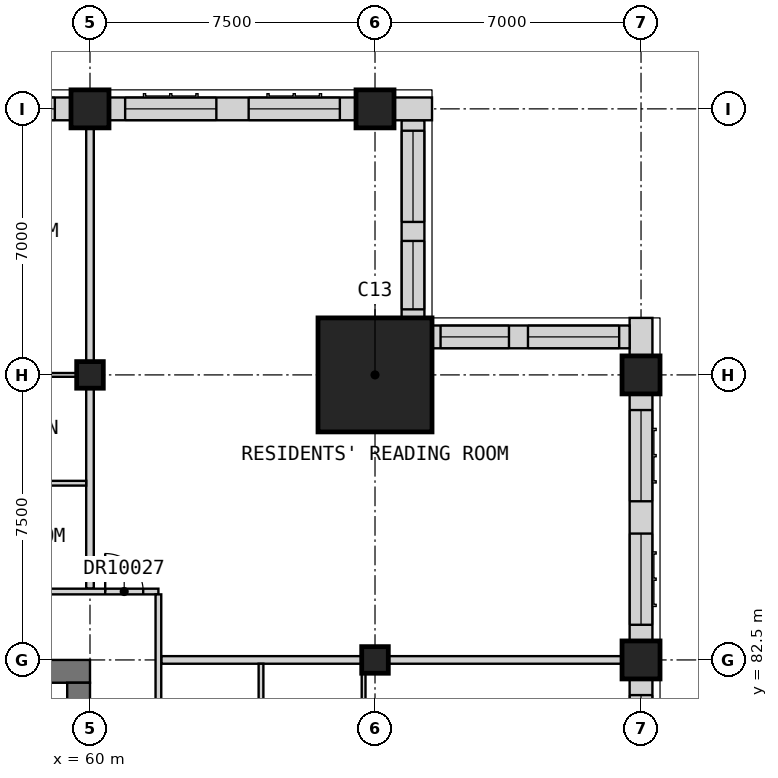
"""IFC4 building model, lengths in metres.
Left out: names, types, materials, properties, quantities, classifications, styles, units other than length and angle.
Written with IfcOpenShell. Run it as: python <this file> out.ifc"""

import sys

from ifc_helpers import new_model, si_unit, direction, frame, frame_2d, origin, origin_2d, place, context, subcontext, project, spatial, rectangle, extrude, element, fill, save


model = new_model("IFC4")
c1 = context("Model", 3, precision=1e-05, world=origin(), true_north=direction((0.0, 1.0)))
c2 = subcontext(c1, "Body", "Model", "MODEL_VIEW")
j1 = project(units=[si_unit("LENGTHUNIT", "METRE"), si_unit("PLANEANGLEUNIT", "RADIAN")], contexts=[c1])
p1 = place(None, origin())
s1 = spatial("IfcSite", under=j1, at=p1, CompositionType="ELEMENT")
p2 = place(p1, origin())
s2 = spatial("IfcBuilding", under=s1, at=p2, CompositionType="ELEMENT")
p3 = place(p2, frame((0.0, 0.0, 273.2)))
s3 = spatial("IfcBuildingStorey", under=s2, at=p3, CompositionType="ELEMENT", Elevation=273.2)
p4 = place(p3, frame((60.0, 90.0, 0.0), z_axis=(0.0, 0.0, 1.0), x_axis=(1.0, 0.0, 0.0)))
e1 = element("IfcColumn", 1, at=p4, inside=s3, PredefinedType="COLUMN", context=c2, shape_type="SweptSolid", body=[
    extrude(rectangle(XDim=0.7, YDim=0.7, at=origin_2d()), origin(), (0.0, 0.0, 1.0), 3.5),
])
p5 = place(p3, frame((60.0, 97.0, 0.0), z_axis=(0.0, 0.0, 1.0), x_axis=(1.0, 0.0, 0.0)))
e2 = element("IfcColumn", 2, at=p5, inside=s3, PredefinedType="COLUMN", context=c2, shape_type="SweptSolid", body=[
    extrude(rectangle(XDim=1.0, YDim=1.0, at=origin_2d()), origin(), (0.0, 0.0, 1.0), 3.5),
])
p6 = place(p3, frame((67.5, 82.5, 0.0), z_axis=(0.0, 0.0, 1.0), x_axis=(1.0, 0.0, 0.0)))
e3 = element("IfcColumn", 3, at=p6, inside=s3, PredefinedType="COLUMN", context=c2, shape_type="SweptSolid", body=[
    extrude(rectangle(XDim=0.7, YDim=0.7, at=origin_2d()), origin(), (0.0, 0.0, 1.0), 3.5),
])
for number, where, z_axis, x_axis in (
    (4, (67.5, 97.0, 0.0), (0.0, 0.0, 1.0), (1.0, 0.0, 0.0)),
    (5, (74.5, 82.5, 0.0), (0.0, 0.0, 1.0), (1.0, 0.0, 0.0)),
    (6, (74.5, 90.0, 0.0), (0.0, 0.0, 1.0), (1.0, 0.0, 0.0)),
):
    element("IfcColumn", number, at=place(p3, frame(where, z_axis=z_axis, x_axis=x_axis)), inside=s3, PredefinedType="COLUMN", context=c2, shape_type="SweptSolid", body=[
        extrude(rectangle(XDim=1.0, YDim=1.0, at=origin_2d()), origin(), (0.0, 0.0, 1.0), 3.5),
    ])
p7 = place(p3, frame((67.5, 90.0, 0.0), z_axis=(0.0, 0.0, 1.0), x_axis=(1.0, 0.0, 0.0)))
e7 = element("IfcColumn", 7, at=p7, inside=s3, PredefinedType="COLUMN", context=c2, shape_type="SweptSolid", body=[
    extrude(rectangle(XDim=3.0, YDim=3.0, at=origin_2d()), origin(), (0.0, 0.0, 1.0), 3.5),
])
p8 = place(p3, frame((30.0, 82.2, 0.0), z_axis=(0.0, 0.0, 1.0), x_axis=(1.0, 0.0, 0.0)))
e8 = element("IfcWall", 8, at=p8, inside=s3, PredefinedType="SHEAR", context=c2, shape_type="SweptSolid", body=[
    extrude(rectangle(XDim=30.0, YDim=0.6, at=frame_2d((15.0, 0.0))), origin(), (0.0, 0.0, 1.0), 3.5),
])
p9 = place(p3, frame((59.7, 60.6, 0.0), z_axis=(0.0, 0.0, 1.0), x_axis=(0.0, 1.0, 0.0)))
e9 = element("IfcWall", 9, at=p9, inside=s3, PredefinedType="SHEAR", context=c2, shape_type="SweptSolid", body=[
    extrude(rectangle(XDim=21.3, YDim=0.6, at=frame_2d((10.65, 0.0))), origin(), (0.0, 0.0, 1.0), 3.5),
])
p10 = place(p9, frame((14.9, 0.0, 0.0)))
e10 = element("IfcOpeningElement", 10, at=p10, cuts=e9, PredefinedType="OPENING", context=c2, shape_type="SweptSolid", body=[
    extrude(rectangle(XDim=1.8, YDim=2.1, at=frame_2d((0.9, 1.05))), frame((0.0, 0.31, 0.0), z_axis=(0.0, -1.0, 0.0), x_axis=(1.0, 0.0, 0.0)), (0.0, 0.0, 1.0), 0.62),
])
p11 = place(p3, frame((74.5, 75.5, 0.0), z_axis=(0.0, 0.0, 1.0), x_axis=(0.0, 1.0, 0.0)))
e11 = element("IfcWall", 11, at=p11, inside=s3, PredefinedType="SOLIDWALL", context=c2, shape_type="SweptSolid", body=[
    extrude(rectangle(XDim=6.5, YDim=0.6, at=frame_2d((3.25, 0.0))), origin(), (0.0, 0.0, 1.0), 2.75),
])
p12 = place(p11, frame((0.425, 0.0, 0.8)))
e12 = element("IfcOpeningElement", 12, at=p12, cuts=e11, PredefinedType="OPENING", context=c2, shape_type="SweptSolid", body=[
    extrude(rectangle(XDim=2.4, YDim=1.8, at=frame_2d((1.2, 0.9))), frame((0.0, 0.31, 0.0), z_axis=(0.0, -1.0, 0.0), x_axis=(1.0, 0.0, 0.0)), (0.0, 0.0, 1.0), 0.62),
])
p13 = place(p11, frame((3.675, 0.0, 0.8)))
e13 = element("IfcOpeningElement", 13, at=p13, cuts=e11, PredefinedType="OPENING", context=c2, shape_type="SweptSolid", body=[
    extrude(rectangle(XDim=2.4, YDim=1.8, at=frame_2d((1.2, 0.9))), frame((0.0, 0.31, 0.0), z_axis=(0.0, -1.0, 0.0), x_axis=(1.0, 0.0, 0.0)), (0.0, 0.0, 1.0), 0.62),
])
p14 = place(p3, frame((74.5, 83.0, 0.0), z_axis=(0.0, 0.0, 1.0), x_axis=(0.0, 1.0, 0.0)))
e14 = element("IfcWall", 14, at=p14, inside=s3, PredefinedType="SOLIDWALL", context=c2, shape_type="SweptSolid", body=[
    extrude(rectangle(XDim=6.5, YDim=0.6, at=frame_2d((3.25, 0.0))), origin(), (0.0, 0.0, 1.0), 2.75),
])
p15 = place(p14, frame((0.425, 0.0, 0.8)))
e15 = element("IfcOpeningElement", 15, at=p15, cuts=e14, PredefinedType="OPENING", context=c2, shape_type="SweptSolid", body=[
    extrude(rectangle(XDim=2.4, YDim=1.8, at=frame_2d((1.2, 0.9))), frame((0.0, 0.31, 0.0), z_axis=(0.0, -1.0, 0.0), x_axis=(1.0, 0.0, 0.0)), (0.0, 0.0, 1.0), 0.62),
])
p16 = place(p14, frame((3.675, 0.0, 0.8)))
e16 = element("IfcOpeningElement", 16, at=p16, cuts=e14, PredefinedType="OPENING", context=c2, shape_type="SweptSolid", body=[
    extrude(rectangle(XDim=2.4, YDim=1.8, at=frame_2d((1.2, 0.9))), frame((0.0, 0.31, 0.0), z_axis=(0.0, -1.0, 0.0), x_axis=(1.0, 0.0, 0.0)), (0.0, 0.0, 1.0), 0.62),
])
p17 = place(p3, frame((74.5, 90.5, 0.0), z_axis=(0.0, 0.0, 1.0), x_axis=(0.0, 1.0, 0.0)))
e17 = element("IfcWall", 17, at=p17, inside=s3, PredefinedType="SOLIDWALL", context=c2, shape_type="SweptSolid", body=[
    extrude(rectangle(XDim=1.0, YDim=0.6, at=frame_2d((0.5, 0.0))), origin(), (0.0, 0.0, 1.0), 3.25),
])
p18 = place(p3, frame((74.2, 91.0, 0.0), z_axis=(0.0, 0.0, 1.0), x_axis=(-1.0, 0.0, 0.0)))
e18 = element("IfcWall", 18, at=p18, inside=s3, PredefinedType="SOLIDWALL", context=c2, shape_type="SweptSolid", body=[
    extrude(rectangle(XDim=5.2, YDim=0.6, at=frame_2d((2.6, 0.0))), origin(), (0.0, 0.0, 1.0), 3.25),
])
p19 = place(p18, frame((3.175, 0.0, 0.8)))
e19 = element("IfcOpeningElement", 19, at=p19, cuts=e18, PredefinedType="OPENING", context=c2, shape_type="SweptSolid", body=[
    extrude(rectangle(XDim=1.8, YDim=1.8, at=frame_2d((0.9, 0.9))), frame((0.0, 0.31, 0.0), z_axis=(0.0, -1.0, 0.0), x_axis=(1.0, 0.0, 0.0)), (0.0, 0.0, 1.0), 0.62),
])
p20 = place(p18, frame((0.275, 0.0, 0.8)))
e20 = element("IfcOpeningElement", 20, at=p20, cuts=e18, PredefinedType="OPENING", context=c2, shape_type="SweptSolid", body=[
    extrude(rectangle(XDim=2.4, YDim=1.8, at=frame_2d((1.2, 0.9))), frame((0.0, 0.31, 0.0), z_axis=(0.0, -1.0, 0.0), x_axis=(1.0, 0.0, 0.0)), (0.0, 0.0, 1.0), 0.62),
])
p21 = place(p3, frame((68.5, 91.5, 0.0), z_axis=(0.0, 0.0, 1.0), x_axis=(0.0, 1.0, 0.0)))
e21 = element("IfcWall", 21, at=p21, inside=s3, PredefinedType="SOLIDWALL", context=c2, shape_type="SweptSolid", body=[
    extrude(rectangle(XDim=5.2, YDim=0.6, at=frame_2d((2.6, 0.0))), origin(), (0.0, 0.0, 1.0), 3.25),
])
p22 = place(p21, frame((0.225, 0.0, 0.8)))
e22 = element("IfcOpeningElement", 22, at=p22, cuts=e21, PredefinedType="OPENING", context=c2, shape_type="SweptSolid", body=[
    extrude(rectangle(XDim=1.8, YDim=1.8, at=frame_2d((0.9, 0.9))), frame((0.0, 0.31, 0.0), z_axis=(0.0, -1.0, 0.0), x_axis=(1.0, 0.0, 0.0)), (0.0, 0.0, 1.0), 0.62),
])
p23 = place(p21, frame((2.525, 0.0, 0.8)))
e23 = element("IfcOpeningElement", 23, at=p23, cuts=e21, PredefinedType="OPENING", context=c2, shape_type="SweptSolid", body=[
    extrude(rectangle(XDim=2.4, YDim=1.8, at=frame_2d((1.2, 0.9))), frame((0.0, 0.31, 0.0), z_axis=(0.0, -1.0, 0.0), x_axis=(1.0, 0.0, 0.0)), (0.0, 0.0, 1.0), 0.62),
])
p24 = place(p3, frame((69.0, 97.0, 0.0), z_axis=(0.0, 0.0, 1.0), x_axis=(-1.0, 0.0, 0.0)))
e24 = element("IfcWall", 24, at=p24, inside=s3, PredefinedType="SOLIDWALL", context=c2, shape_type="SweptSolid", body=[
    extrude(rectangle(XDim=1.0, YDim=0.6, at=frame_2d((0.5, 0.0))), origin(), (0.0, 0.0, 1.0), 3.25),
])
p25 = place(p3, frame((67.0, 97.0, 0.0), z_axis=(0.0, 0.0, 1.0), x_axis=(-1.0, 0.0, 0.0)))
e25 = element("IfcWall", 25, at=p25, inside=s3, PredefinedType="SOLIDWALL", context=c2, shape_type="SweptSolid", body=[
    extrude(rectangle(XDim=6.5, YDim=0.6, at=frame_2d((3.25, 0.0))), origin(), (0.0, 0.0, 1.0), 2.75),
])
p26 = place(p25, frame((3.675, 0.0, 0.8)))
e26 = element("IfcOpeningElement", 26, at=p26, cuts=e25, PredefinedType="OPENING", context=c2, shape_type="SweptSolid", body=[
    extrude(rectangle(XDim=2.4, YDim=1.8, at=frame_2d((1.2, 0.9))), frame((0.0, 0.31, 0.0), z_axis=(0.0, -1.0, 0.0), x_axis=(1.0, 0.0, 0.0)), (0.0, 0.0, 1.0), 0.62),
])
p27 = place(p25, frame((0.425, 0.0, 0.8)))
e27 = element("IfcOpeningElement", 27, at=p27, cuts=e25, PredefinedType="OPENING", context=c2, shape_type="SweptSolid", body=[
    extrude(rectangle(XDim=2.4, YDim=1.8, at=frame_2d((1.2, 0.9))), frame((0.0, 0.31, 0.0), z_axis=(0.0, -1.0, 0.0), x_axis=(1.0, 0.0, 0.0)), (0.0, 0.0, 1.0), 0.62),
])
p28 = place(p3, frame((59.5, 97.0, 0.0), z_axis=(0.0, 0.0, 1.0), x_axis=(-1.0, 0.0, 0.0)))
e28 = element("IfcWall", 28, at=p28, inside=s3, PredefinedType="SOLIDWALL", context=c2, shape_type="SweptSolid", body=[
    extrude(rectangle(XDim=6.5, YDim=0.6, at=frame_2d((3.25, 0.0))), origin(), (0.0, 0.0, 1.0), 2.75),
])
p29 = place(p28, frame((3.675, 0.0, 0.8)))
e29 = element("IfcOpeningElement", 29, at=p29, cuts=e28, PredefinedType="OPENING", context=c2, shape_type="SweptSolid", body=[
    extrude(rectangle(XDim=2.4, YDim=1.8, at=frame_2d((1.2, 0.9))), frame((0.0, 0.31, 0.0), z_axis=(0.0, -1.0, 0.0), x_axis=(1.0, 0.0, 0.0)), (0.0, 0.0, 1.0), 0.62),
])
p30 = place(p28, frame((0.425, 0.0, 0.8)))
e30 = element("IfcOpeningElement", 30, at=p30, cuts=e28, PredefinedType="OPENING", context=c2, shape_type="SweptSolid", body=[
    extrude(rectangle(XDim=2.4, YDim=1.8, at=frame_2d((1.2, 0.9))), frame((0.0, 0.31, 0.0), z_axis=(0.0, -1.0, 0.0), x_axis=(1.0, 0.0, 0.0)), (0.0, 0.0, 1.0), 0.62),
])
for number, where, z_axis, x_axis in (
    (31, (61.875, 82.5, 0.0), (0.0, 0.0, 1.0), (1.0, 0.0, 0.0)),
    (32, (60.0, 84.375, 0.0), (0.0, 0.0, 1.0), (0.0, 1.0, 0.0)),
):
    element("IfcWall", number, at=place(p3, frame(where, z_axis=z_axis, x_axis=x_axis)), inside=s3, PredefinedType="PARTITIONING", context=c2, shape_type="SweptSolid", body=[
        extrude(rectangle(XDim=13.125, YDim=0.2, at=frame_2d((6.562, 0.0))), origin(), (0.0, 0.0, 1.0), 3.25),
    ])
p31 = place(p3, frame((33.75, 84.3, 0.0), z_axis=(0.0, 0.0, 1.0), x_axis=(1.0, 0.0, 0.0)))
e33 = element("IfcWall", 33, at=p31, inside=s3, PredefinedType="PARTITIONING", context=c2, shape_type="SweptSolid", body=[
    extrude(rectangle(XDim=28.05, YDim=0.15, at=frame_2d((14.025, 0.0))), origin(), (0.0, 0.0, 1.0), 3.25),
])
p32 = place(p31, frame((5.125, 0.0, 0.0)))
e34 = element("IfcOpeningElement", 34, at=p32, cuts=e33, PredefinedType="OPENING", context=c2, shape_type="SweptSolid", body=[
    extrude(rectangle(XDim=1.0, YDim=2.1, at=frame_2d((0.5, 1.05))), frame((0.0, 0.085, 0.0), z_axis=(0.0, -1.0, 0.0), x_axis=(1.0, 0.0, 0.0)), (0.0, 0.0, 1.0), 0.17),
])
p33 = place(p31, frame((12.675, 0.0, 0.0)))
e35 = element("IfcOpeningElement", 35, at=p33, cuts=e33, PredefinedType="OPENING", context=c2, shape_type="SweptSolid", body=[
    extrude(rectangle(XDim=0.9, YDim=2.1, at=frame_2d((0.45, 1.05))), frame((0.0, 0.085, 0.0), z_axis=(0.0, -1.0, 0.0), x_axis=(1.0, 0.0, 0.0)), (0.0, 0.0, 1.0), 0.17),
])
p34 = place(p31, frame((20.175, 0.0, 0.0)))
e36 = element("IfcOpeningElement", 36, at=p34, cuts=e33, PredefinedType="OPENING", context=c2, shape_type="SweptSolid", body=[
    extrude(rectangle(XDim=0.9, YDim=2.1, at=frame_2d((0.45, 1.05))), frame((0.0, 0.085, 0.0), z_axis=(0.0, -1.0, 0.0), x_axis=(1.0, 0.0, 0.0)), (0.0, 0.0, 1.0), 0.17),
])
p35 = place(p31, frame((26.65, 0.0, 0.0)))
e37 = element("IfcOpeningElement", 37, at=p35, cuts=e33, PredefinedType="OPENING", context=c2, shape_type="SweptSolid", body=[
    extrude(rectangle(XDim=1.0, YDim=2.1, at=frame_2d((0.5, 1.05))), frame((0.0, 0.085, 0.0), z_axis=(0.0, -1.0, 0.0), x_axis=(1.0, 0.0, 0.0)), (0.0, 0.0, 1.0), 0.17),
])
p36 = place(p3, frame((61.8, 58.275, 0.0), z_axis=(0.0, 0.0, 1.0), x_axis=(0.0, 1.0, 0.0)))
e38 = element("IfcWall", 38, at=p36, inside=s3, PredefinedType="PARTITIONING", context=c2, shape_type="SweptSolid", body=[
    extrude(rectangle(XDim=25.95, YDim=0.15, at=frame_2d((12.975, 0.0))), origin(), (0.0, 0.0, 1.0), 3.25),
])
p37 = place(p36, frame((6.9, 0.0, 0.0)))
e39 = element("IfcOpeningElement", 39, at=p37, cuts=e38, PredefinedType="OPENING", context=c2, shape_type="SweptSolid", body=[
    extrude(rectangle(XDim=0.9, YDim=2.1, at=frame_2d((0.45, 1.05))), frame((0.0, 0.085, 0.0), z_axis=(0.0, -1.0, 0.0), x_axis=(1.0, 0.0, 0.0)), (0.0, 0.0, 1.0), 0.17),
])
p38 = place(p36, frame((18.15, 0.0, 0.0)))
e40 = element("IfcOpeningElement", 40, at=p38, cuts=e38, PredefinedType="OPENING", context=c2, shape_type="SweptSolid", body=[
    extrude(rectangle(XDim=0.9, YDim=2.1, at=frame_2d((0.45, 1.05))), frame((0.0, 0.085, 0.0), z_axis=(0.0, -1.0, 0.0), x_axis=(1.0, 0.0, 0.0)), (0.0, 0.0, 1.0), 0.17),
])
p39 = place(p3, frame((45.1, 90.0, 0.0), z_axis=(0.0, 0.0, 1.0), x_axis=(1.0, 0.0, 0.0)))
e41 = element("IfcWall", 41, at=p39, inside=s3, PredefinedType="PARTITIONING", context=c2, shape_type="SweptSolid", body=[
    extrude(rectangle(XDim=14.8, YDim=0.1, at=frame_2d((7.4, 0.0))), origin(), (0.0, 0.0, 1.0), 3.25),
])
p40 = place(p39, frame((1.325, 0.0, 0.0)))
e42 = element("IfcOpeningElement", 42, at=p40, cuts=e41, PredefinedType="OPENING", context=c2, shape_type="SweptSolid", body=[
    extrude(rectangle(XDim=0.9, YDim=2.1, at=frame_2d((0.45, 1.05))), frame((0.0, 0.06, 0.0), z_axis=(0.0, -1.0, 0.0), x_axis=(1.0, 0.0, 0.0)), (0.0, 0.0, 1.0), 0.12),
])
p41 = place(p39, frame((8.825, 0.0, 0.0)))
e43 = element("IfcOpeningElement", 43, at=p41, cuts=e41, PredefinedType="OPENING", context=c2, shape_type="SweptSolid", body=[
    extrude(rectangle(XDim=0.9, YDim=2.1, at=frame_2d((0.45, 1.05))), frame((0.0, 0.06, 0.0), z_axis=(0.0, -1.0, 0.0), x_axis=(1.0, 0.0, 0.0)), (0.0, 0.0, 1.0), 0.12),
])
p42 = place(p3, frame((67.2, 60.1, 0.0), z_axis=(0.0, 0.0, 1.0), x_axis=(0.0, 1.0, 0.0)))
e44 = element("IfcWall", 44, at=p42, inside=s3, PredefinedType="PARTITIONING", context=c2, shape_type="SweptSolid", body=[
    extrude(rectangle(XDim=22.3, YDim=0.1, at=frame_2d((11.15, 0.0))), origin(), (0.0, 0.0, 1.0), 3.25),
])
p43 = place(p42, frame((1.325, 0.0, 0.0)))
e45 = element("IfcOpeningElement", 45, at=p43, cuts=e44, PredefinedType="OPENING", context=c2, shape_type="SweptSolid", body=[
    extrude(rectangle(XDim=0.9, YDim=2.1, at=frame_2d((0.45, 1.05))), frame((0.0, 0.06, 0.0), z_axis=(0.0, -1.0, 0.0), x_axis=(1.0, 0.0, 0.0)), (0.0, 0.0, 1.0), 0.12),
])
p44 = place(p42, frame((5.075, 0.0, 0.0)))
e46 = element("IfcOpeningElement", 46, at=p44, cuts=e44, PredefinedType="OPENING", context=c2, shape_type="SweptSolid", body=[
    extrude(rectangle(XDim=0.9, YDim=2.1, at=frame_2d((0.45, 1.05))), frame((0.0, 0.06, 0.0), z_axis=(0.0, -1.0, 0.0), x_axis=(1.0, 0.0, 0.0)), (0.0, 0.0, 1.0), 0.12),
])
p45 = place(p42, frame((12.575, 0.0, 0.0)))
e47 = element("IfcOpeningElement", 47, at=p45, cuts=e44, PredefinedType="OPENING", context=c2, shape_type="SweptSolid", body=[
    extrude(rectangle(XDim=0.9, YDim=2.1, at=frame_2d((0.45, 1.05))), frame((0.0, 0.06, 0.0), z_axis=(0.0, -1.0, 0.0), x_axis=(1.0, 0.0, 0.0)), (0.0, 0.0, 1.0), 0.12),
])
p46 = place(p42, frame((16.325, 0.0, 0.0)))
e48 = element("IfcOpeningElement", 48, at=p46, cuts=e44, PredefinedType="OPENING", context=c2, shape_type="SweptSolid", body=[
    extrude(rectangle(XDim=0.9, YDim=2.1, at=frame_2d((0.45, 1.05))), frame((0.0, 0.06, 0.0), z_axis=(0.0, -1.0, 0.0), x_axis=(1.0, 0.0, 0.0)), (0.0, 0.0, 1.0), 0.12),
])
p47 = place(p3, frame((56.25, 87.15, 0.0), z_axis=(0.0, 0.0, 1.0), x_axis=(1.0, 0.0, 0.0)))
e49 = element("IfcWall", 49, at=p47, inside=s3, PredefinedType="PARTITIONING", context=c2, shape_type="SweptSolid", body=[
    extrude(rectangle(XDim=3.65, YDim=0.125, at=frame_2d((1.825, 0.0))), origin(), (0.0, 0.0, 1.0), 3.25),
])
p48 = place(p3, frame((64.5, 78.812, 0.0), z_axis=(0.0, 0.0, 1.0), x_axis=(0.0, 1.0, 0.0)))
e50 = element("IfcWall", 50, at=p48, inside=s3, PredefinedType="PARTITIONING", context=c2, shape_type="SweptSolid", body=[
    extrude(rectangle(XDim=3.587, YDim=0.125, at=frame_2d((1.794, 0.0))), origin(), (0.0, 0.0, 1.0), 3.25),
])
p49 = place(p13, origin())
e51 = element("IfcWindow", 51, at=p49, inside=s3, PartitioningType="SINGLE_PANEL", PredefinedType="WINDOW", context=c2, shape_type="SweptSolid", body=[
    extrude(rectangle(XDim=2.4, YDim=1.8, at=frame_2d((1.2, 0.9))), frame((0.0, -0.07, 0.0), z_axis=(0.0, -1.0, 0.0), x_axis=(1.0, 0.0, 0.0)), (0.0, 0.0, 1.0), 0.06),
])
fill(e13, e51)
p50 = place(p15, origin())
e52 = element("IfcWindow", 52, at=p50, inside=s3, PartitioningType="SINGLE_PANEL", PredefinedType="WINDOW", context=c2, shape_type="SweptSolid", body=[
    extrude(rectangle(XDim=2.4, YDim=1.8, at=frame_2d((1.2, 0.9))), frame((0.0, -0.07, 0.0), z_axis=(0.0, -1.0, 0.0), x_axis=(1.0, 0.0, 0.0)), (0.0, 0.0, 1.0), 0.06),
])
fill(e15, e52)
p51 = place(p16, origin())
e53 = element("IfcWindow", 53, at=p51, inside=s3, PartitioningType="SINGLE_PANEL", PredefinedType="WINDOW", context=c2, shape_type="SweptSolid", body=[
    extrude(rectangle(XDim=2.4, YDim=1.8, at=frame_2d((1.2, 0.9))), frame((0.0, -0.07, 0.0), z_axis=(0.0, -1.0, 0.0), x_axis=(1.0, 0.0, 0.0)), (0.0, 0.0, 1.0), 0.06),
])
fill(e16, e53)
p52 = place(p19, origin())
e54 = element("IfcWindow", 54, at=p52, inside=s3, PartitioningType="SINGLE_PANEL", PredefinedType="WINDOW", context=c2, shape_type="SweptSolid", body=[
    extrude(rectangle(XDim=1.8, YDim=1.8, at=frame_2d((0.9, 0.9))), frame((0.0, -0.07, 0.0), z_axis=(0.0, -1.0, 0.0), x_axis=(1.0, 0.0, 0.0)), (0.0, 0.0, 1.0), 0.06),
])
fill(e19, e54)
p53 = place(p20, origin())
e55 = element("IfcWindow", 55, at=p53, inside=s3, PartitioningType="SINGLE_PANEL", PredefinedType="WINDOW", context=c2, shape_type="SweptSolid", body=[
    extrude(rectangle(XDim=2.4, YDim=1.8, at=frame_2d((1.2, 0.9))), frame((0.0, -0.07, 0.0), z_axis=(0.0, -1.0, 0.0), x_axis=(1.0, 0.0, 0.0)), (0.0, 0.0, 1.0), 0.06),
])
fill(e20, e55)
p54 = place(p22, origin())
e56 = element("IfcWindow", 56, at=p54, inside=s3, PartitioningType="SINGLE_PANEL", PredefinedType="WINDOW", context=c2, shape_type="SweptSolid", body=[
    extrude(rectangle(XDim=1.8, YDim=1.8, at=frame_2d((0.9, 0.9))), frame((0.0, -0.07, 0.0), z_axis=(0.0, -1.0, 0.0), x_axis=(1.0, 0.0, 0.0)), (0.0, 0.0, 1.0), 0.06),
])
fill(e22, e56)
p55 = place(p23, origin())
e57 = element("IfcWindow", 57, at=p55, inside=s3, PartitioningType="SINGLE_PANEL", PredefinedType="WINDOW", context=c2, shape_type="SweptSolid", body=[
    extrude(rectangle(XDim=2.4, YDim=1.8, at=frame_2d((1.2, 0.9))), frame((0.0, -0.07, 0.0), z_axis=(0.0, -1.0, 0.0), x_axis=(1.0, 0.0, 0.0)), (0.0, 0.0, 1.0), 0.06),
])
fill(e23, e57)
p56 = place(p26, origin())
e58 = element("IfcWindow", 58, at=p56, inside=s3, PartitioningType="SINGLE_PANEL", PredefinedType="WINDOW", context=c2, shape_type="SweptSolid", body=[
    extrude(rectangle(XDim=2.4, YDim=1.8, at=frame_2d((1.2, 0.9))), frame((0.0, -0.07, 0.0), z_axis=(0.0, -1.0, 0.0), x_axis=(1.0, 0.0, 0.0)), (0.0, 0.0, 1.0), 0.06),
])
fill(e26, e58)
p57 = place(p27, origin())
e59 = element("IfcWindow", 59, at=p57, inside=s3, PartitioningType="SINGLE_PANEL", PredefinedType="WINDOW", context=c2, shape_type="SweptSolid", body=[
    extrude(rectangle(XDim=2.4, YDim=1.8, at=frame_2d((1.2, 0.9))), frame((0.0, -0.07, 0.0), z_axis=(0.0, -1.0, 0.0), x_axis=(1.0, 0.0, 0.0)), (0.0, 0.0, 1.0), 0.06),
])
fill(e27, e59)
p58 = place(p30, origin())
e60 = element("IfcWindow", 60, at=p58, inside=s3, PartitioningType="SINGLE_PANEL", PredefinedType="WINDOW", context=c2, shape_type="SweptSolid", body=[
    extrude(rectangle(XDim=2.4, YDim=1.8, at=frame_2d((1.2, 0.9))), frame((0.0, -0.07, 0.0), z_axis=(0.0, -1.0, 0.0), x_axis=(1.0, 0.0, 0.0)), (0.0, 0.0, 1.0), 0.06),
])
fill(e30, e60)
p59 = place(p35, origin())
e61 = element("IfcDoor", 61, at=p59, inside=s3, OperationType="SINGLE_SWING_LEFT", PredefinedType="DOOR", context=c2, shape_type="SweptSolid", body=[
    extrude(rectangle(XDim=1.0, YDim=2.1, at=frame_2d((0.5, 1.05))), frame((0.0, 0.025, 0.0), z_axis=(0.0, -1.0, 0.0), x_axis=(1.0, 0.0, 0.0)), (0.0, 0.0, 1.0), 0.05),
])
fill(e37, e61)
save(model, sys.argv[1])
